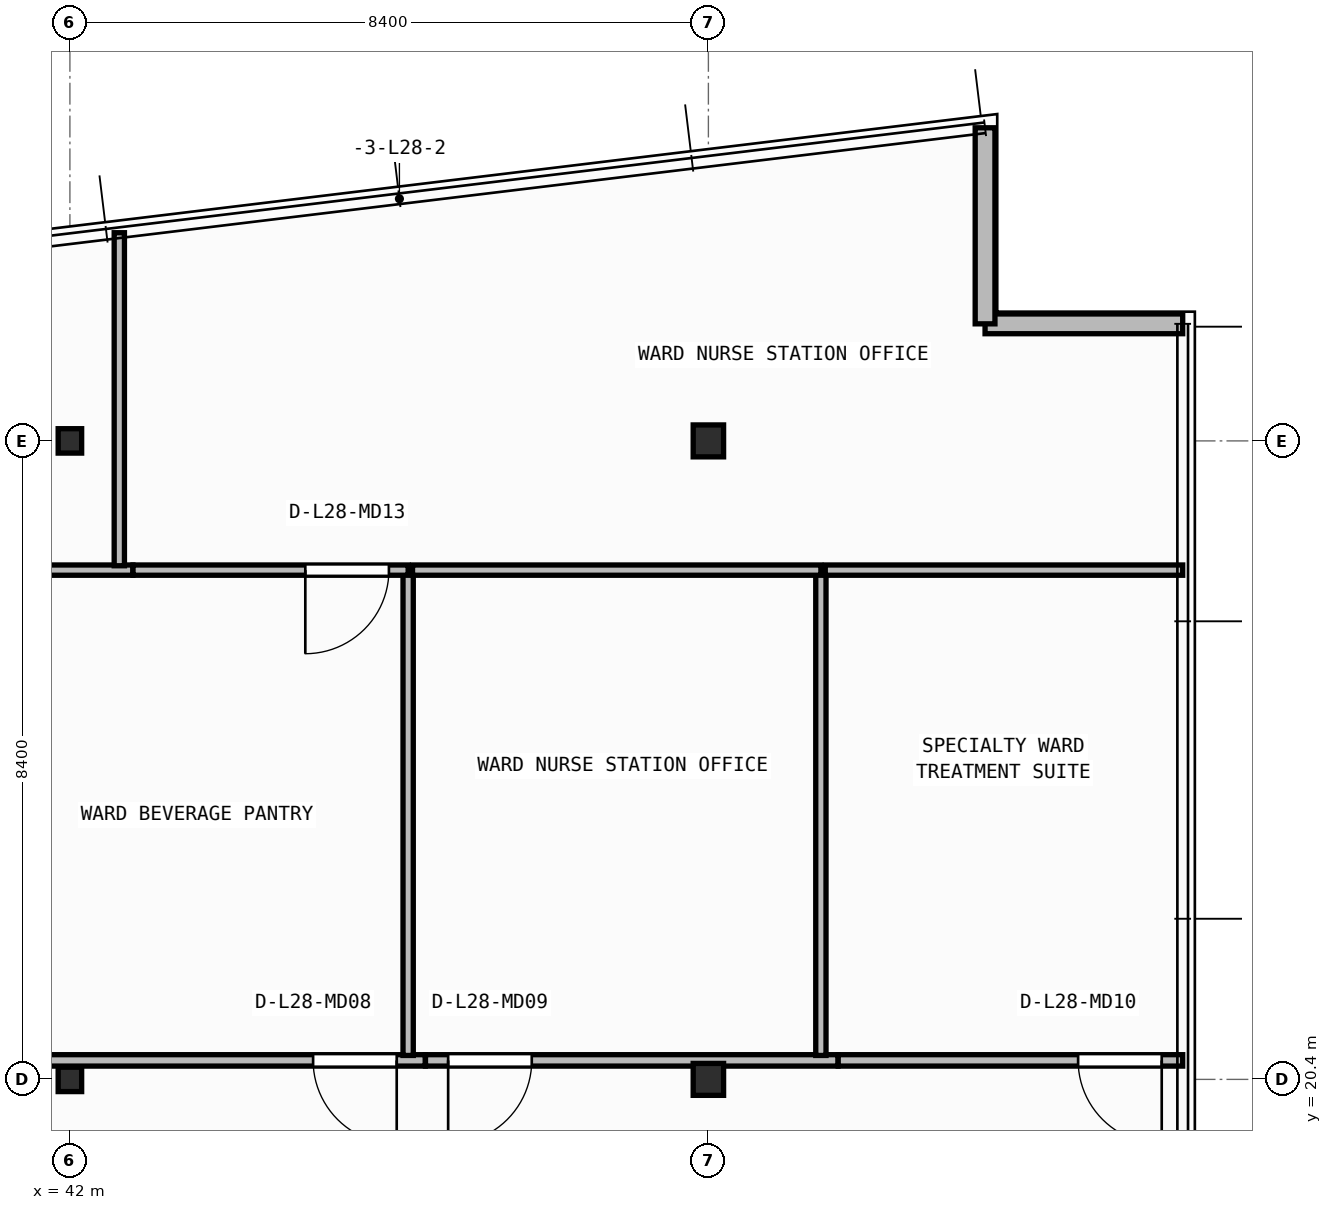
"""IFC4 building model, lengths in metres.
Left out: names, types, materials, properties, quantities, classifications, styles, units other than length and angle.
Written with IfcOpenShell. Run it as: python <this file> out.ifc"""

import sys

from ifc_helpers import new_model, si_unit, direction, frame, frame_2d, origin, origin_2d, place, context, subcontext, project, spatial, rectangle, i_section, extrude, element, fill, save


model = new_model("IFC4")
c1 = context("Model", 3, precision=1e-05, world=origin(), true_north=direction((0.0, 1.0)))
c2 = subcontext(c1, "Body", "Model", "MODEL_VIEW")
j1 = project(units=[si_unit("LENGTHUNIT", "METRE"), si_unit("PLANEANGLEUNIT", "RADIAN")], contexts=[c1])
p1 = place(None, origin())
s1 = spatial("IfcSite", under=j1, at=p1, CompositionType="ELEMENT")
p2 = place(p1, origin())
s2 = spatial("IfcBuilding", under=s1, at=p2, CompositionType="ELEMENT")
p3 = place(p2, frame((0.0, 0.0, 115.2)))
s3 = spatial("IfcBuildingStorey", under=s2, at=p3, CompositionType="ELEMENT", Elevation=115.2)
p4 = place(p3, frame((42.0, 20.4, 0.0), z_axis=(0.0, 0.0, 1.0), x_axis=(1.0, 0.0, 0.0)))
e1 = element("IfcColumn", 1, at=p4, inside=s3, PredefinedType="COLUMN", context=c2, shape_type="SweptSolid", body=[
    extrude(i_section(OverallWidth=0.309, OverallDepth=0.321, WebThickness=0.014, FlangeThickness=0.022, FilletRadius=0.017, at=origin_2d()), origin(), (0.0, 0.0, 1.0), 3.95),
])
p5 = place(p3, frame((50.4, 20.4, 0.0), z_axis=(0.0, 0.0, 1.0), x_axis=(1.0, 0.0, 0.0)))
e2 = element("IfcColumn", 2, at=p5, inside=s3, PredefinedType="COLUMN", context=c2, shape_type="SweptSolid", body=[
    extrude(i_section(OverallWidth=0.4, OverallDepth=0.42, WebThickness=0.025, FlangeThickness=0.04, at=origin_2d()), origin(), (0.0, 0.0, 1.0), 3.95),
])
p6 = place(p3, frame((42.0, 28.8, 0.0), z_axis=(0.0, 0.0, 1.0), x_axis=(1.0, 0.0, 0.0)))
e3 = element("IfcColumn", 3, at=p6, inside=s3, PredefinedType="COLUMN", context=c2, shape_type="SweptSolid", body=[
    extrude(i_section(OverallWidth=0.309, OverallDepth=0.321, WebThickness=0.014, FlangeThickness=0.022, FilletRadius=0.017, at=origin_2d()), origin(), (0.0, 0.0, 1.0), 3.95),
])
p7 = place(p3, frame((50.4, 28.8, 0.0), z_axis=(0.0, 0.0, 1.0), x_axis=(1.0, 0.0, 0.0)))
e4 = element("IfcColumn", 4, at=p7, inside=s3, PredefinedType="COLUMN", context=c2, shape_type="SweptSolid", body=[
    extrude(i_section(OverallWidth=0.4, OverallDepth=0.42, WebThickness=0.025, FlangeThickness=0.04, at=origin_2d()), origin(), (0.0, 0.0, 1.0), 3.95),
])
p8 = place(p3, frame((56.64, 30.34, 0.0), z_axis=(0.0, 0.0, 1.0), x_axis=(-1.0, 0.0, 0.0)))
e5 = element("IfcWall", 5, at=p8, inside=s3, PredefinedType="STANDARD", context=c2, shape_type="SweptSolid", body=[
    extrude(rectangle(XDim=2.6, YDim=0.26, at=frame_2d((1.3, 0.0))), origin(), (0.0, 0.0, 1.0), 3.71),
])
p9 = place(p3, frame((54.04, 30.34, 0.0), z_axis=(0.0, 0.0, 1.0), x_axis=(0.0, 1.0, 0.0)))
e6 = element("IfcWall", 6, at=p9, inside=s3, PredefinedType="STANDARD", context=c2, shape_type="SweptSolid", body=[
    extrude(rectangle(XDim=2.579, YDim=0.26, at=frame_2d((1.29, 0.0))), origin(), (0.0, 0.0, 1.0), 3.71),
])
p10 = place(p3, frame((46.676, 20.65, 0.0), z_axis=(0.0, 0.0, 1.0), x_axis=(-1.0, 0.0, 0.0)))
e7 = element("IfcWall", 7, at=p10, inside=s3, PredefinedType="PARTITIONING", context=c2, shape_type="SweptSolid", body=[
    extrude(rectangle(XDim=5.028, YDim=0.15, at=frame_2d((2.514, 0.0))), origin(), (0.0, 0.0, 1.0), 3.083),
])
p11 = place(p10, frame((0.376, 0.0, 0.0)))
e8 = element("IfcOpeningElement", 8, at=p11, cuts=e7, PredefinedType="OPENING", context=c2, shape_type="SweptSolid", body=[
    extrude(rectangle(XDim=1.1, YDim=2.1, at=frame_2d((0.55, 1.05))), frame((0.0, 0.085, 0.0), z_axis=(0.0, -1.0, 0.0), x_axis=(1.0, 0.0, 0.0)), (0.0, 0.0, 1.0), 0.17),
])
p12 = place(p3, frame((52.106, 20.65, 0.0), z_axis=(0.0, 0.0, 1.0), x_axis=(-1.0, 0.0, 0.0)))
e9 = element("IfcWall", 9, at=p12, inside=s3, PredefinedType="PARTITIONING", context=c2, shape_type="SweptSolid", body=[
    extrude(rectangle(XDim=5.428, YDim=0.15, at=frame_2d((2.714, 0.0))), origin(), (0.0, 0.0, 1.0), 3.083),
])
p13 = place(p12, frame((4.03, 0.0, 0.0)))
e10 = element("IfcOpeningElement", 10, at=p13, cuts=e9, PredefinedType="OPENING", context=c2, shape_type="SweptSolid", body=[
    extrude(rectangle(XDim=1.1, YDim=2.1, at=frame_2d((0.55, 1.05))), frame((0.0, 0.085, 0.0), z_axis=(0.0, -1.0, 0.0), x_axis=(1.0, 0.0, 0.0)), (0.0, 0.0, 1.0), 0.17),
])
p14 = place(p3, frame((56.64, 20.65, 0.0), z_axis=(0.0, 0.0, 1.0), x_axis=(-1.0, 0.0, 0.0)))
e11 = element("IfcWall", 11, at=p14, inside=s3, PredefinedType="PARTITIONING", context=c2, shape_type="SweptSolid", body=[
    extrude(rectangle(XDim=4.532, YDim=0.15, at=frame_2d((2.266, 0.0))), origin(), (0.0, 0.0, 1.0), 3.71),
])
p15 = place(p14, frame((0.276, 0.0, 0.0)))
e12 = element("IfcOpeningElement", 12, at=p15, cuts=e11, PredefinedType="OPENING", context=c2, shape_type="SweptSolid", body=[
    extrude(rectangle(XDim=1.1, YDim=2.1, at=frame_2d((0.55, 1.05))), frame((0.0, 0.085, 0.0), z_axis=(0.0, -1.0, 0.0), x_axis=(1.0, 0.0, 0.0)), (0.0, 0.0, 1.0), 0.17),
])
p16 = place(p3, frame((46.45, 20.715, 0.0), z_axis=(0.0, 0.0, 1.0), x_axis=(0.0, 1.0, 0.0)))
e13 = element("IfcWall", 13, at=p16, inside=s3, PredefinedType="PARTITIONING", context=c2, shape_type="SweptSolid", body=[
    extrude(rectangle(XDim=6.385, YDim=0.135, at=frame_2d((3.192, 0.0))), origin(), (0.0, 0.0, 1.0), 3.71),
])
p17 = place(p3, frame((42.829, 27.1, 0.0), z_axis=(0.0, 0.0, 1.0), x_axis=(-1.0, 0.0, 0.0)))
e14 = element("IfcWall", 14, at=p17, inside=s3, PredefinedType="PARTITIONING", context=c2, shape_type="SweptSolid", body=[
    extrude(rectangle(XDim=1.351, YDim=0.135, at=frame_2d((0.676, 0.0))), origin(), (0.0, 0.0, 1.0), 3.71),
])
p18 = place(p3, frame((46.45, 27.1, 0.0), z_axis=(0.0, 0.0, 1.0), x_axis=(-1.0, 0.0, 0.0)))
e15 = element("IfcWall", 15, at=p18, inside=s3, PredefinedType="PARTITIONING", context=c2, shape_type="SweptSolid", body=[
    extrude(rectangle(XDim=3.619, YDim=0.135, at=frame_2d((1.81, 0.0))), origin(), (0.0, 0.0, 1.0), 3.71),
])
p19 = place(p18, frame((0.253, 0.0, 0.0)))
e16 = element("IfcOpeningElement", 16, at=p19, cuts=e15, PredefinedType="OPENING", context=c2, shape_type="SweptSolid", body=[
    extrude(rectangle(XDim=1.1, YDim=2.1, at=frame_2d((0.55, 1.05))), frame((0.0, 0.077, 0.0), z_axis=(0.0, -1.0, 0.0), x_axis=(1.0, 0.0, 0.0)), (0.0, 0.0, 1.0), 0.155),
])
p20 = place(p3, frame((51.88, 20.715, 0.0), z_axis=(0.0, 0.0, 1.0), x_axis=(0.0, 1.0, 0.0)))
e17 = element("IfcWall", 17, at=p20, inside=s3, PredefinedType="PARTITIONING", context=c2, shape_type="SweptSolid", body=[
    extrude(rectangle(XDim=6.385, YDim=0.135, at=frame_2d((3.192, 0.0))), origin(), (0.0, 0.0, 1.0), 3.71),
])
p21 = place(p3, frame((51.88, 27.1, 0.0), z_axis=(0.0, 0.0, 1.0), x_axis=(-1.0, 0.0, 0.0)))
e18 = element("IfcWall", 18, at=p21, inside=s3, PredefinedType="PARTITIONING", context=c2, shape_type="SweptSolid", body=[
    extrude(rectangle(XDim=5.372, YDim=0.135, at=frame_2d((2.686, 0.0))), origin(), (0.0, 0.0, 1.0), 3.71),
])
p22 = place(p3, frame((56.64, 27.1, 0.0), z_axis=(0.0, 0.0, 1.0), x_axis=(-1.0, 0.0, 0.0)))
e19 = element("IfcWall", 19, at=p22, inside=s3, PredefinedType="PARTITIONING", context=c2, shape_type="SweptSolid", body=[
    extrude(rectangle(XDim=4.702, YDim=0.135, at=frame_2d((2.351, 0.0))), origin(), (0.0, 0.0, 1.0), 3.71),
])
p23 = place(p3, frame((42.65, 27.157, 0.0), z_axis=(0.0, 0.0, 1.0), x_axis=(0.0, 1.0, 0.0)))
e20 = element("IfcWall", 20, at=p23, inside=s3, PredefinedType="PARTITIONING", context=c2, shape_type="SweptSolid", body=[
    extrude(rectangle(XDim=4.381, YDim=0.135, at=frame_2d((2.191, 0.0))), origin(), (0.0, 0.0, 1.0), 3.71),
])
p24 = place(p11, origin())
e21 = element("IfcDoor", 21, at=p24, inside=s3, OperationType="SINGLE_SWING_LEFT", PredefinedType="DOOR", context=c2, shape_type="SweptSolid", body=[
    extrude(rectangle(XDim=1.1, YDim=2.1, at=frame_2d((0.55, 1.05))), frame((0.0, 0.025, 0.0), z_axis=(0.0, -1.0, 0.0), x_axis=(1.0, 0.0, 0.0)), (0.0, 0.0, 1.0), 0.05),
])
fill(e8, e21)
p25 = place(p13, origin())
e22 = element("IfcDoor", 22, at=p25, inside=s3, OperationType="SINGLE_SWING_RIGHT", PredefinedType="DOOR", context=c2, shape_type="SweptSolid", body=[
    extrude(rectangle(XDim=1.1, YDim=2.1, at=frame_2d((0.55, 1.05))), frame((0.0, 0.025, 0.0), z_axis=(0.0, -1.0, 0.0), x_axis=(1.0, 0.0, 0.0)), (0.0, 0.0, 1.0), 0.05),
])
fill(e10, e22)
p26 = place(p15, origin())
e23 = element("IfcDoor", 23, at=p26, inside=s3, OperationType="SINGLE_SWING_LEFT", PredefinedType="DOOR", context=c2, shape_type="SweptSolid", body=[
    extrude(rectangle(XDim=1.1, YDim=2.1, at=frame_2d((0.55, 1.05))), frame((0.0, 0.025, 0.0), z_axis=(0.0, -1.0, 0.0), x_axis=(1.0, 0.0, 0.0)), (0.0, 0.0, 1.0), 0.05),
])
fill(e12, e23)
p27 = place(p19, origin())
e24 = element("IfcDoor", 24, at=p27, inside=s3, OperationType="SINGLE_SWING_RIGHT", PredefinedType="DOOR", context=c2, shape_type="SweptSolid", body=[
    extrude(rectangle(XDim=1.1, YDim=2.1, at=frame_2d((0.55, 1.05))), frame((0.0, 0.025, 0.0), z_axis=(0.0, -1.0, 0.0), x_axis=(1.0, 0.0, 0.0)), (0.0, 0.0, 1.0), 0.05),
])
fill(e16, e24)
save(model, sys.argv[1])
